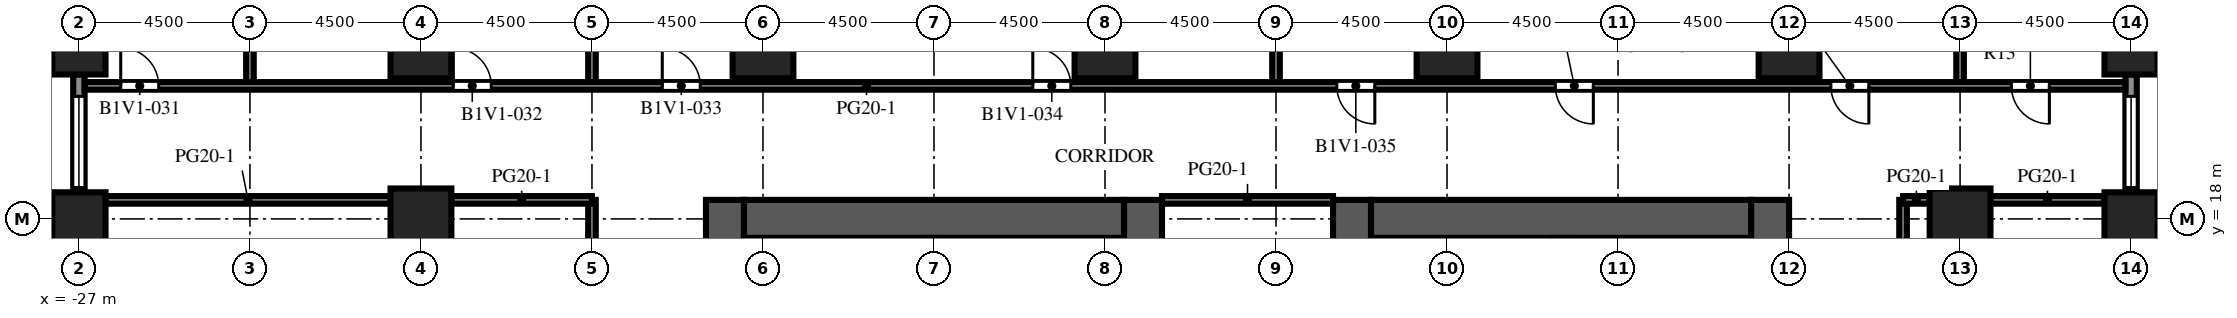
"""IFC4 building model, lengths in metres.
Left out: names, types, materials, properties, quantities, classifications, styles, units other than length and angle.
Written with IfcOpenShell. Run it as: python <this file> out.ifc"""

import sys

from ifc_helpers import new_model, si_unit, direction, frame, frame_2d, origin, origin_2d, place, context, subcontext, project, spatial, rectangle, extrude, element, fill, save


model = new_model("IFC4")
c1 = context("Model", 3, precision=1e-05, world=origin(), true_north=direction((0.0, 1.0)))
c2 = subcontext(c1, "Body", "Model", "MODEL_VIEW")
j1 = project(units=[si_unit("LENGTHUNIT", "METRE"), si_unit("PLANEANGLEUNIT", "RADIAN")], contexts=[c1])
p1 = place(None, origin())
s1 = spatial("IfcSite", under=j1, at=p1, CompositionType="ELEMENT")
p2 = place(p1, origin())
s2 = spatial("IfcBuilding", under=s1, at=p2, CompositionType="ELEMENT")
p3 = place(p2, frame((0.0, 0.0, 19.5)))
s3 = spatial("IfcBuildingStorey", under=s2, at=p3, CompositionType="ELEMENT", Elevation=19.5)
for number, where, z_axis, x_axis in (
    (1, (-27.0, 18.0, 0.0), (0.0, 0.0, 1.0), (1.0, 0.0, 0.0)),
    (2, (-27.0, 22.5, 0.0), (0.0, 0.0, 1.0), (1.0, 0.0, 0.0)),
    (3, (27.0, 18.0, 0.0), (0.0, 0.0, 1.0), (1.0, 0.0, 0.0)),
    (4, (27.0, 22.5, 0.0), (0.0, 0.0, 1.0), (1.0, 0.0, 0.0)),
):
    element("IfcColumn", number, at=place(p3, frame(where, z_axis=z_axis, x_axis=x_axis)), inside=s3, PredefinedType="COLUMN", context=c2, shape_type="SweptSolid", body=[
        extrude(rectangle(XDim=1.4, YDim=1.4, at=origin_2d()), origin(), (0.0, 0.0, 1.0), 4.1),
    ])
for number, where, z_axis, x_axis in (
    (5, (-18.0, 18.0, 0.0), (0.0, 0.0, 1.0), (1.0, 0.0, 0.0)),
    (6, (-18.0, 22.5, 0.0), (0.0, 0.0, 1.0), (1.0, 0.0, 0.0)),
    (7, (-9.0, 22.5, 0.0), (0.0, 0.0, 1.0), (1.0, 0.0, 0.0)),
    (8, (0.0, 22.5, 0.0), (0.0, 0.0, 1.0), (1.0, 0.0, 0.0)),
    (9, (9.0, 22.5, 0.0), (0.0, 0.0, 1.0), (1.0, 0.0, 0.0)),
    (10, (18.0, 22.5, 0.0), (0.0, 0.0, 1.0), (1.0, 0.0, 0.0)),
    (11, (22.5, 18.0, 0.0), (0.0, 0.0, 1.0), (1.0, 0.0, 0.0)),
):
    element("IfcColumn", number, at=place(p3, frame(where, z_axis=z_axis, x_axis=x_axis)), inside=s3, PredefinedType="COLUMN", context=c2, shape_type="SweptSolid", body=[
        extrude(rectangle(XDim=1.6, YDim=1.6, at=origin_2d()), origin(), (0.0, 0.0, 1.0), 4.1),
    ])
p4 = place(p3, frame((-10.0, -9.0, 0.0), z_axis=(0.0, 0.0, 1.0), x_axis=(0.0, 1.0, 0.0)))
e12 = element("IfcWall", 12, at=p4, inside=s3, PredefinedType="SHEAR", context=c2, shape_type="SweptSolid", body=[
    extrude(rectangle(XDim=27.5, YDim=1.0, at=frame_2d((13.75, 0.0))), origin(), (0.0, 0.0, 1.0), 4.1),
])
p5 = place(p4, frame((12.55, 0.0, 0.0)))
e13 = element("IfcOpeningElement", 13, at=p5, cuts=e12, PredefinedType="OPENING", context=c2, shape_type="SweptSolid", body=[
    extrude(rectangle(XDim=2.4, YDim=2.4, at=frame_2d((1.2, 1.2))), frame((0.0, 0.51, 0.0), z_axis=(0.0, -1.0, 0.0), x_axis=(1.0, 0.0, 0.0)), (0.0, 0.0, 1.0), 1.02),
])
p6 = place(p4, frame((6.825, 0.0, 0.0)))
e14 = element("IfcOpeningElement", 14, at=p6, cuts=e12, PredefinedType="OPENING", context=c2, shape_type="SweptSolid", body=[
    extrude(rectangle(XDim=1.2, YDim=2.1, at=frame_2d((0.6, 1.05))), frame((0.0, 0.51, 0.0), z_axis=(0.0, -1.0, 0.0), x_axis=(1.0, 0.0, 0.0)), (0.0, 0.0, 1.0), 1.02),
])
p7 = place(p4, frame((19.475, 0.0, 0.0)))
e15 = element("IfcOpeningElement", 15, at=p7, cuts=e12, PredefinedType="OPENING", context=c2, shape_type="SweptSolid", body=[
    extrude(rectangle(XDim=1.2, YDim=2.1, at=frame_2d((0.6, 1.05))), frame((0.0, 0.51, 0.0), z_axis=(0.0, -1.0, 0.0), x_axis=(1.0, 0.0, 0.0)), (0.0, 0.0, 1.0), 1.02),
])
p8 = place(p3, frame((1.0, -9.0, 0.0), z_axis=(0.0, 0.0, 1.0), x_axis=(0.0, 1.0, 0.0)))
e16 = element("IfcWall", 16, at=p8, inside=s3, PredefinedType="SHEAR", context=c2, shape_type="SweptSolid", body=[
    extrude(rectangle(XDim=27.5, YDim=1.0, at=frame_2d((13.75, 0.0))), origin(), (0.0, 0.0, 1.0), 4.1),
])
p9 = place(p8, frame((12.55, 0.0, 0.0)))
e17 = element("IfcOpeningElement", 17, at=p9, cuts=e16, PredefinedType="OPENING", context=c2, shape_type="SweptSolid", body=[
    extrude(rectangle(XDim=2.4, YDim=2.4, at=frame_2d((1.2, 1.2))), frame((0.0, 0.51, 0.0), z_axis=(0.0, -1.0, 0.0), x_axis=(1.0, 0.0, 0.0)), (0.0, 0.0, 1.0), 1.02),
])
p10 = place(p8, frame((3.955, 0.0, 0.0)))
e18 = element("IfcOpeningElement", 18, at=p10, cuts=e16, PredefinedType="OPENING", context=c2, shape_type="SweptSolid", body=[
    extrude(rectangle(XDim=0.905, YDim=2.1, at=frame_2d((0.453, 1.05))), frame((0.0, 0.51, 0.0), z_axis=(0.0, -1.0, 0.0), x_axis=(1.0, 0.0, 0.0)), (0.0, 0.0, 1.0), 1.02),
])
p11 = place(p8, frame((23.363, 0.0, 0.0)))
e19 = element("IfcOpeningElement", 19, at=p11, cuts=e16, PredefinedType="OPENING", context=c2, shape_type="SweptSolid", body=[
    extrude(rectangle(XDim=1.2, YDim=2.1, at=frame_2d((0.6, 1.05))), frame((0.0, 0.51, 0.0), z_axis=(0.0, -1.0, 0.0), x_axis=(1.0, 0.0, 0.0)), (0.0, 0.0, 1.0), 1.02),
])
p12 = place(p3, frame((-9.5, 18.0, 0.0), z_axis=(0.0, 0.0, 1.0), x_axis=(1.0, 0.0, 0.0)))
e20 = element("IfcWall", 20, at=p12, inside=s3, PredefinedType="SHEAR", context=c2, shape_type="SweptSolid", body=[
    extrude(rectangle(XDim=10.0, YDim=1.0, at=frame_2d((5.0, 0.0))), origin(), (0.0, 0.0, 1.0), 4.1),
])
p13 = place(p3, frame((6.5, -9.0, 0.0), z_axis=(0.0, 0.0, 1.0), x_axis=(0.0, 1.0, 0.0)))
e21 = element("IfcWall", 21, at=p13, inside=s3, PredefinedType="SHEAR", context=c2, shape_type="SweptSolid", body=[
    extrude(rectangle(XDim=27.5, YDim=1.0, at=frame_2d((13.75, 0.0))), origin(), (0.0, 0.0, 1.0), 4.1),
])
p14 = place(p13, frame((12.55, 0.0, 0.0)))
e22 = element("IfcOpeningElement", 22, at=p14, cuts=e21, PredefinedType="OPENING", context=c2, shape_type="SweptSolid", body=[
    extrude(rectangle(XDim=2.4, YDim=2.4, at=frame_2d((1.2, 1.2))), frame((0.0, 0.51, 0.0), z_axis=(0.0, -1.0, 0.0), x_axis=(1.0, 0.0, 0.0)), (0.0, 0.0, 1.0), 1.02),
])
p15 = place(p13, frame((3.955, 0.0, 0.0)))
e23 = element("IfcOpeningElement", 23, at=p15, cuts=e21, PredefinedType="OPENING", context=c2, shape_type="SweptSolid", body=[
    extrude(rectangle(XDim=0.905, YDim=2.1, at=frame_2d((0.453, 1.05))), frame((0.0, 0.51, 0.0), z_axis=(0.0, -1.0, 0.0), x_axis=(1.0, 0.0, 0.0)), (0.0, 0.0, 1.0), 1.02),
])
p16 = place(p13, frame((23.363, 0.0, 0.0)))
e24 = element("IfcOpeningElement", 24, at=p16, cuts=e21, PredefinedType="OPENING", context=c2, shape_type="SweptSolid", body=[
    extrude(rectangle(XDim=1.2, YDim=2.1, at=frame_2d((0.6, 1.05))), frame((0.0, 0.51, 0.0), z_axis=(0.0, -1.0, 0.0), x_axis=(1.0, 0.0, 0.0)), (0.0, 0.0, 1.0), 1.02),
])
p17 = place(p3, frame((17.5, -9.0, 0.0), z_axis=(0.0, 0.0, 1.0), x_axis=(0.0, 1.0, 0.0)))
e25 = element("IfcWall", 25, at=p17, inside=s3, PredefinedType="SHEAR", context=c2, shape_type="SweptSolid", body=[
    extrude(rectangle(XDim=27.5, YDim=1.0, at=frame_2d((13.75, 0.0))), origin(), (0.0, 0.0, 1.0), 4.1),
])
p18 = place(p17, frame((12.55, 0.0, 0.0)))
e26 = element("IfcOpeningElement", 26, at=p18, cuts=e25, PredefinedType="OPENING", context=c2, shape_type="SweptSolid", body=[
    extrude(rectangle(XDim=2.4, YDim=2.4, at=frame_2d((1.2, 1.2))), frame((0.0, 0.51, 0.0), z_axis=(0.0, -1.0, 0.0), x_axis=(1.0, 0.0, 0.0)), (0.0, 0.0, 1.0), 1.02),
])
p19 = place(p17, frame((6.825, 0.0, 0.0)))
e27 = element("IfcOpeningElement", 27, at=p19, cuts=e25, PredefinedType="OPENING", context=c2, shape_type="SweptSolid", body=[
    extrude(rectangle(XDim=1.2, YDim=2.1, at=frame_2d((0.6, 1.05))), frame((0.0, 0.51, 0.0), z_axis=(0.0, -1.0, 0.0), x_axis=(1.0, 0.0, 0.0)), (0.0, 0.0, 1.0), 1.02),
])
p20 = place(p17, frame((19.475, 0.0, 0.0)))
e28 = element("IfcOpeningElement", 28, at=p20, cuts=e25, PredefinedType="OPENING", context=c2, shape_type="SweptSolid", body=[
    extrude(rectangle(XDim=1.2, YDim=2.1, at=frame_2d((0.6, 1.05))), frame((0.0, 0.51, 0.0), z_axis=(0.0, -1.0, 0.0), x_axis=(1.0, 0.0, 0.0)), (0.0, 0.0, 1.0), 1.02),
])
p21 = place(p3, frame((7.0, 18.0, 0.0), z_axis=(0.0, 0.0, 1.0), x_axis=(1.0, 0.0, 0.0)))
e29 = element("IfcWall", 29, at=p21, inside=s3, PredefinedType="SHEAR", context=c2, shape_type="SweptSolid", body=[
    extrude(rectangle(XDim=10.0, YDim=1.0, at=frame_2d((5.0, 0.0))), origin(), (0.0, 0.0, 1.0), 4.1),
])
p22 = place(p3, frame((27.0, 21.8, 0.0), z_axis=(0.0, 0.0, 1.0), x_axis=(0.0, -1.0, 0.0)))
e30 = element("IfcWall", 30, at=p22, inside=s3, PredefinedType="SOLIDWALL", context=c2, shape_type="SweptSolid", body=[
    extrude(rectangle(XDim=3.1, YDim=0.3, at=frame_2d((1.55, 0.0))), origin(), (0.0, 0.0, 1.0), 2.75),
])
p23 = place(p22, frame((0.575, 0.0, 0.8)))
e31 = element("IfcOpeningElement", 31, at=p23, cuts=e30, PredefinedType="OPENING", context=c2, shape_type="SweptSolid", body=[
    extrude(rectangle(XDim=2.4, YDim=1.7, at=frame_2d((1.2, 0.85))), frame((0.0, 0.16, 0.0), z_axis=(0.0, -1.0, 0.0), x_axis=(1.0, 0.0, 0.0)), (0.0, 0.0, 1.0), 0.32),
])
p24 = place(p3, frame((-27.0, 18.7, 0.0), z_axis=(0.0, 0.0, 1.0), x_axis=(0.0, 1.0, 0.0)))
e32 = element("IfcWall", 32, at=p24, inside=s3, PredefinedType="SOLIDWALL", context=c2, shape_type="SweptSolid", body=[
    extrude(rectangle(XDim=3.1, YDim=0.3, at=frame_2d((1.55, 0.0))), origin(), (0.0, 0.0, 1.0), 2.75),
])
p25 = place(p24, frame((0.125, 0.0, 0.8)))
e33 = element("IfcOpeningElement", 33, at=p25, cuts=e32, PredefinedType="OPENING", context=c2, shape_type="SweptSolid", body=[
    extrude(rectangle(XDim=2.4, YDim=1.7, at=frame_2d((1.2, 0.85))), frame((0.0, 0.16, 0.0), z_axis=(0.0, -1.0, 0.0), x_axis=(1.0, 0.0, 0.0)), (0.0, 0.0, 1.0), 0.32),
])
p26 = place(p3, frame((-22.5, 21.5, 0.0), z_axis=(0.0, 0.0, 1.0), x_axis=(0.0, 1.0, 0.0)))
e34 = element("IfcWall", 34, at=p26, inside=s3, PredefinedType="PARTITIONING", context=c2, shape_type="SweptSolid", body=[
    extrude(rectangle(XDim=4.8, YDim=0.2, at=frame_2d((2.4, 0.0))), origin(), (0.0, 0.0, 1.0), 3.65),
])
p27 = place(p3, frame((-13.5, -9.0, 0.0), z_axis=(0.0, 0.0, 1.0), x_axis=(0.0, 1.0, 0.0)))
e35 = element("IfcWall", 35, at=p27, inside=s3, PredefinedType="PARTITIONING", context=c2, shape_type="SweptSolid", body=[
    extrude(rectangle(XDim=27.5, YDim=0.2, at=frame_2d((13.75, 0.0))), origin(), (0.0, 0.0, 1.0), 3.65),
])
p28 = place(p27, frame((8.6, 0.0, 0.0)))
e36 = element("IfcOpeningElement", 36, at=p28, cuts=e35, PredefinedType="OPENING", context=c2, shape_type="SweptSolid", body=[
    extrude(rectangle(XDim=1.0, YDim=2.1, at=frame_2d((0.5, 1.05))), frame((0.0, 0.11, 0.0), z_axis=(0.0, -1.0, 0.0), x_axis=(1.0, 0.0, 0.0)), (0.0, 0.0, 1.0), 0.22),
])
p29 = place(p27, frame((15.1, 0.0, 0.0)))
e37 = element("IfcOpeningElement", 37, at=p29, cuts=e35, PredefinedType="OPENING", context=c2, shape_type="SweptSolid", body=[
    extrude(rectangle(XDim=1.0, YDim=2.1, at=frame_2d((0.5, 1.05))), frame((0.0, 0.11, 0.0), z_axis=(0.0, -1.0, 0.0), x_axis=(1.0, 0.0, 0.0)), (0.0, 0.0, 1.0), 0.22),
])
p30 = place(p27, frame((21.6, 0.0, 0.0)))
e38 = element("IfcOpeningElement", 38, at=p30, cuts=e35, PredefinedType="OPENING", context=c2, shape_type="SweptSolid", body=[
    extrude(rectangle(XDim=1.0, YDim=2.1, at=frame_2d((0.5, 1.05))), frame((0.0, 0.11, 0.0), z_axis=(0.0, -1.0, 0.0), x_axis=(1.0, 0.0, 0.0)), (0.0, 0.0, 1.0), 0.22),
])
for number, where, z_axis, x_axis in (
    (39, (-13.5, 21.5, 0.0), (0.0, 0.0, 1.0), (0.0, 1.0, 0.0)),
    (40, (4.5, 21.5, 0.0), (0.0, 0.0, 1.0), (0.0, 1.0, 0.0)),
):
    element("IfcWall", number, at=place(p3, frame(where, z_axis=z_axis, x_axis=x_axis)), inside=s3, PredefinedType="PARTITIONING", context=c2, shape_type="SweptSolid", body=[
        extrude(rectangle(XDim=4.8, YDim=0.2, at=frame_2d((2.4, 0.0))), origin(), (0.0, 0.0, 1.0), 3.65),
    ])
p31 = place(p3, frame((21.0, 18.5, 0.0), z_axis=(0.0, 0.0, 1.0), x_axis=(0.0, -1.0, 0.0)))
e41 = element("IfcWall", 41, at=p31, inside=s3, PredefinedType="PARTITIONING", context=c2, shape_type="SweptSolid", body=[
    extrude(rectangle(XDim=27.5, YDim=0.2, at=frame_2d((13.75, 0.0))), origin(), (0.0, 0.0, 1.0), 3.65),
])
p32 = place(p31, frame((19.4, 0.0, 0.0)))
e42 = element("IfcOpeningElement", 42, at=p32, cuts=e41, PredefinedType="OPENING", context=c2, shape_type="SweptSolid", body=[
    extrude(rectangle(XDim=1.0, YDim=2.1, at=frame_2d((0.5, 1.05))), frame((0.0, 0.11, 0.0), z_axis=(0.0, -1.0, 0.0), x_axis=(1.0, 0.0, 0.0)), (0.0, 0.0, 1.0), 0.22),
])
p33 = place(p31, frame((11.15, 0.0, 0.0)))
e43 = element("IfcOpeningElement", 43, at=p33, cuts=e41, PredefinedType="OPENING", context=c2, shape_type="SweptSolid", body=[
    extrude(rectangle(XDim=1.0, YDim=2.1, at=frame_2d((0.5, 1.05))), frame((0.0, 0.11, 0.0), z_axis=(0.0, -1.0, 0.0), x_axis=(1.0, 0.0, 0.0)), (0.0, 0.0, 1.0), 0.22),
])
p34 = place(p31, frame((4.65, 0.0, 0.0)))
e44 = element("IfcOpeningElement", 44, at=p34, cuts=e41, PredefinedType="OPENING", context=c2, shape_type="SweptSolid", body=[
    extrude(rectangle(XDim=1.0, YDim=2.1, at=frame_2d((0.5, 1.05))), frame((0.0, 0.11, 0.0), z_axis=(0.0, -1.0, 0.0), x_axis=(1.0, 0.0, 0.0)), (0.0, 0.0, 1.0), 0.22),
])
p35 = place(p3, frame((22.5, 21.5, 0.0), z_axis=(0.0, 0.0, 1.0), x_axis=(0.0, 1.0, 0.0)))
e45 = element("IfcWall", 45, at=p35, inside=s3, PredefinedType="PARTITIONING", context=c2, shape_type="SweptSolid", body=[
    extrude(rectangle(XDim=4.8, YDim=0.2, at=frame_2d((2.4, 0.0))), origin(), (0.0, 0.0, 1.0), 3.65),
])
p36 = place(p3, frame((-26.3, 18.5, 0.0), z_axis=(0.0, 0.0, 1.0), x_axis=(1.0, 0.0, 0.0)))
e46 = element("IfcWall", 46, at=p36, inside=s3, PredefinedType="PARTITIONING", context=c2, shape_type="SweptSolid", body=[
    extrude(rectangle(XDim=7.5, YDim=0.2, at=frame_2d((3.75, 0.0))), origin(), (0.0, 0.0, 1.0), 3.65),
])
p37 = place(p3, frame((-17.2, 18.5, 0.0), z_axis=(0.0, 0.0, 1.0), x_axis=(1.0, 0.0, 0.0)))
e47 = element("IfcWall", 47, at=p37, inside=s3, PredefinedType="PARTITIONING", context=c2, shape_type="SweptSolid", body=[
    extrude(rectangle(XDim=3.7, YDim=0.2, at=frame_2d((1.85, 0.0))), origin(), (0.0, 0.0, 1.0), 3.65),
])
p38 = place(p3, frame((1.5, 18.5, 0.0), z_axis=(0.0, 0.0, 1.0), x_axis=(1.0, 0.0, 0.0)))
e48 = element("IfcWall", 48, at=p38, inside=s3, PredefinedType="PARTITIONING", context=c2, shape_type="SweptSolid", body=[
    extrude(rectangle(XDim=4.5, YDim=0.2, at=frame_2d((2.25, 0.0))), origin(), (0.0, 0.0, 1.0), 3.65),
])
p39 = place(p3, frame((21.0, 18.5, 0.0), z_axis=(0.0, 0.0, 1.0), x_axis=(1.0, 0.0, 0.0)))
e49 = element("IfcWall", 49, at=p39, inside=s3, PredefinedType="PARTITIONING", context=c2, shape_type="SweptSolid", body=[
    extrude(rectangle(XDim=0.7, YDim=0.2, at=frame_2d((0.35, 0.0))), origin(), (0.0, 0.0, 1.0), 3.65),
])
p40 = place(p3, frame((23.3, 18.5, 0.0), z_axis=(0.0, 0.0, 1.0), x_axis=(1.0, 0.0, 0.0)))
e50 = element("IfcWall", 50, at=p40, inside=s3, PredefinedType="PARTITIONING", context=c2, shape_type="SweptSolid", body=[
    extrude(rectangle(XDim=3.0, YDim=0.2, at=frame_2d((1.5, 0.0))), origin(), (0.0, 0.0, 1.0), 3.65),
])
p41 = place(p3, frame((-26.85, 21.5, 0.0), z_axis=(0.0, 0.0, 1.0), x_axis=(1.0, 0.0, 0.0)))
e51 = element("IfcWall", 51, at=p41, inside=s3, PredefinedType="PARTITIONING", context=c2, shape_type="SweptSolid", body=[
    extrude(rectangle(XDim=53.7, YDim=0.2, at=frame_2d((26.85, 0.0))), origin(), (0.0, 0.0, 1.0), 3.65),
])
p42 = place(p41, frame((0.95, 0.0, 0.0)))
e52 = element("IfcOpeningElement", 52, at=p42, cuts=e51, PredefinedType="OPENING", context=c2, shape_type="SweptSolid", body=[
    extrude(rectangle(XDim=1.0, YDim=2.1, at=frame_2d((0.5, 1.05))), frame((0.0, 0.11, 0.0), z_axis=(0.0, -1.0, 0.0), x_axis=(1.0, 0.0, 0.0)), (0.0, 0.0, 1.0), 0.22),
])
p43 = place(p41, frame((9.7, 0.0, 0.0)))
e53 = element("IfcOpeningElement", 53, at=p43, cuts=e51, PredefinedType="OPENING", context=c2, shape_type="SweptSolid", body=[
    extrude(rectangle(XDim=1.0, YDim=2.1, at=frame_2d((0.5, 1.05))), frame((0.0, 0.11, 0.0), z_axis=(0.0, -1.0, 0.0), x_axis=(1.0, 0.0, 0.0)), (0.0, 0.0, 1.0), 0.22),
])
p44 = place(p41, frame((15.2, 0.0, 0.0)))
e54 = element("IfcOpeningElement", 54, at=p44, cuts=e51, PredefinedType="OPENING", context=c2, shape_type="SweptSolid", body=[
    extrude(rectangle(XDim=1.0, YDim=2.1, at=frame_2d((0.5, 1.05))), frame((0.0, 0.11, 0.0), z_axis=(0.0, -1.0, 0.0), x_axis=(1.0, 0.0, 0.0)), (0.0, 0.0, 1.0), 0.22),
])
p45 = place(p41, frame((24.95, 0.0, 0.0)))
e55 = element("IfcOpeningElement", 55, at=p45, cuts=e51, PredefinedType="OPENING", context=c2, shape_type="SweptSolid", body=[
    extrude(rectangle(XDim=1.0, YDim=2.1, at=frame_2d((0.5, 1.05))), frame((0.0, 0.11, 0.0), z_axis=(0.0, -1.0, 0.0), x_axis=(1.0, 0.0, 0.0)), (0.0, 0.0, 1.0), 0.22),
])
p46 = place(p41, frame((32.95, 0.0, 0.0)))
e56 = element("IfcOpeningElement", 56, at=p46, cuts=e51, PredefinedType="OPENING", context=c2, shape_type="SweptSolid", body=[
    extrude(rectangle(XDim=1.0, YDim=2.1, at=frame_2d((0.5, 1.05))), frame((0.0, 0.11, 0.0), z_axis=(0.0, -1.0, 0.0), x_axis=(1.0, 0.0, 0.0)), (0.0, 0.0, 1.0), 0.22),
])
p47 = place(p41, frame((38.7, 0.0, 0.0)))
e57 = element("IfcOpeningElement", 57, at=p47, cuts=e51, PredefinedType="OPENING", context=c2, shape_type="SweptSolid", body=[
    extrude(rectangle(XDim=1.0, YDim=2.1, at=frame_2d((0.5, 1.05))), frame((0.0, 0.11, 0.0), z_axis=(0.0, -1.0, 0.0), x_axis=(1.0, 0.0, 0.0)), (0.0, 0.0, 1.0), 0.22),
])
p48 = place(p41, frame((45.95, 0.0, 0.0)))
e58 = element("IfcOpeningElement", 58, at=p48, cuts=e51, PredefinedType="OPENING", context=c2, shape_type="SweptSolid", body=[
    extrude(rectangle(XDim=1.0, YDim=2.1, at=frame_2d((0.5, 1.05))), frame((0.0, 0.11, 0.0), z_axis=(0.0, -1.0, 0.0), x_axis=(1.0, 0.0, 0.0)), (0.0, 0.0, 1.0), 0.22),
])
p49 = place(p41, frame((50.7, 0.0, 0.0)))
e59 = element("IfcOpeningElement", 59, at=p49, cuts=e51, PredefinedType="OPENING", context=c2, shape_type="SweptSolid", body=[
    extrude(rectangle(XDim=1.0, YDim=2.1, at=frame_2d((0.5, 1.05))), frame((0.0, 0.11, 0.0), z_axis=(0.0, -1.0, 0.0), x_axis=(1.0, 0.0, 0.0)), (0.0, 0.0, 1.0), 0.22),
])
p50 = place(p23, origin())
e60 = element("IfcWindow", 60, at=p50, inside=s3, PartitioningType="SINGLE_PANEL", PredefinedType="WINDOW", context=c2, shape_type="SweptSolid", body=[
    extrude(rectangle(XDim=2.4, YDim=1.7, at=frame_2d((1.2, 0.85))), frame((0.0, 0.03, 0.0), z_axis=(0.0, -1.0, 0.0), x_axis=(1.0, 0.0, 0.0)), (0.0, 0.0, 1.0), 0.06),
])
fill(e31, e60)
p51 = place(p25, origin())
e61 = element("IfcWindow", 61, at=p51, inside=s3, PartitioningType="SINGLE_PANEL", PredefinedType="WINDOW", context=c2, shape_type="SweptSolid", body=[
    extrude(rectangle(XDim=2.4, YDim=1.7, at=frame_2d((1.2, 0.85))), frame((0.0, 0.03, 0.0), z_axis=(0.0, -1.0, 0.0), x_axis=(1.0, 0.0, 0.0)), (0.0, 0.0, 1.0), 0.06),
])
fill(e33, e61)
p52 = place(p42, origin())
e62 = element("IfcDoor", 62, at=p52, inside=s3, OperationType="SINGLE_SWING_LEFT", PredefinedType="DOOR", context=c2, shape_type="SweptSolid", body=[
    extrude(rectangle(XDim=1.0, YDim=2.1, at=frame_2d((0.5, 1.05))), frame((0.0, 0.025, 0.0), z_axis=(0.0, -1.0, 0.0), x_axis=(1.0, 0.0, 0.0)), (0.0, 0.0, 1.0), 0.05),
])
fill(e52, e62)
p53 = place(p43, origin())
e63 = element("IfcDoor", 63, at=p53, inside=s3, OperationType="SINGLE_SWING_LEFT", PredefinedType="DOOR", context=c2, shape_type="SweptSolid", body=[
    extrude(rectangle(XDim=1.0, YDim=2.1, at=frame_2d((0.5, 1.05))), frame((0.0, 0.025, 0.0), z_axis=(0.0, -1.0, 0.0), x_axis=(1.0, 0.0, 0.0)), (0.0, 0.0, 1.0), 0.05),
])
fill(e53, e63)
p54 = place(p44, origin())
e64 = element("IfcDoor", 64, at=p54, inside=s3, OperationType="SINGLE_SWING_LEFT", PredefinedType="DOOR", context=c2, shape_type="SweptSolid", body=[
    extrude(rectangle(XDim=1.0, YDim=2.1, at=frame_2d((0.5, 1.05))), frame((0.0, 0.025, 0.0), z_axis=(0.0, -1.0, 0.0), x_axis=(1.0, 0.0, 0.0)), (0.0, 0.0, 1.0), 0.05),
])
fill(e54, e64)
p55 = place(p45, origin())
e65 = element("IfcDoor", 65, at=p55, inside=s3, OperationType="SINGLE_SWING_LEFT", PredefinedType="DOOR", context=c2, shape_type="SweptSolid", body=[
    extrude(rectangle(XDim=1.0, YDim=2.1, at=frame_2d((0.5, 1.05))), frame((0.0, 0.025, 0.0), z_axis=(0.0, -1.0, 0.0), x_axis=(1.0, 0.0, 0.0)), (0.0, 0.0, 1.0), 0.05),
])
fill(e55, e65)
p56 = place(p46, origin())
e66 = element("IfcDoor", 66, at=p56, inside=s3, OperationType="SINGLE_SWING_RIGHT", PredefinedType="DOOR", context=c2, shape_type="SweptSolid", body=[
    extrude(rectangle(XDim=1.0, YDim=2.1, at=frame_2d((0.5, 1.05))), frame((0.0, 0.025, 0.0), z_axis=(0.0, -1.0, 0.0), x_axis=(1.0, 0.0, 0.0)), (0.0, 0.0, 1.0), 0.05),
])
fill(e56, e66)
p57 = place(p47, origin())
e67 = element("IfcDoor", 67, at=p57, inside=s3, OperationType="SINGLE_SWING_RIGHT", PredefinedType="DOOR", context=c2, shape_type="SweptSolid", body=[
    extrude(rectangle(XDim=1.0, YDim=2.1, at=frame_2d((0.5, 1.05))), frame((0.0, 0.025, 0.0), z_axis=(0.0, -1.0, 0.0), x_axis=(1.0, 0.0, 0.0)), (0.0, 0.0, 1.0), 0.05),
])
fill(e57, e67)
p58 = place(p48, origin())
e68 = element("IfcDoor", 68, at=p58, inside=s3, OperationType="SINGLE_SWING_RIGHT", PredefinedType="DOOR", context=c2, shape_type="SweptSolid", body=[
    extrude(rectangle(XDim=1.0, YDim=2.1, at=frame_2d((0.5, 1.05))), frame((0.0, 0.025, 0.0), z_axis=(0.0, -1.0, 0.0), x_axis=(1.0, 0.0, 0.0)), (0.0, 0.0, 1.0), 0.05),
])
fill(e58, e68)
p59 = place(p49, origin())
e69 = element("IfcDoor", 69, at=p59, inside=s3, OperationType="SINGLE_SWING_RIGHT", PredefinedType="DOOR", context=c2, shape_type="SweptSolid", body=[
    extrude(rectangle(XDim=1.0, YDim=2.1, at=frame_2d((0.5, 1.05))), frame((0.0, 0.025, 0.0), z_axis=(0.0, -1.0, 0.0), x_axis=(1.0, 0.0, 0.0)), (0.0, 0.0, 1.0), 0.05),
])
fill(e59, e69)
save(model, sys.argv[1])
